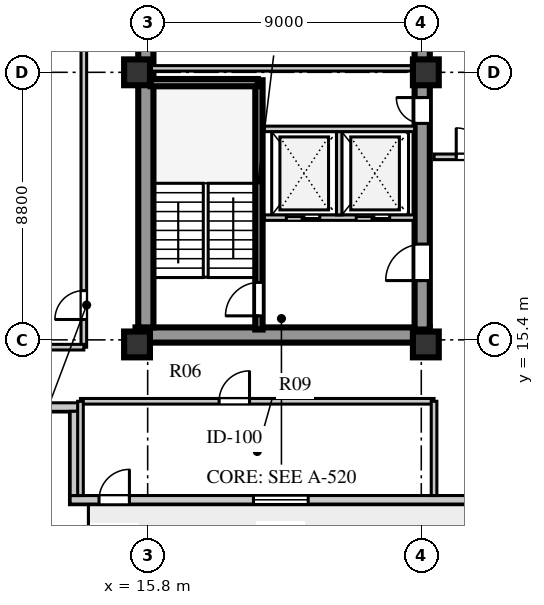
"""IFC4 building model, lengths in metres.
Left out: names, types, materials, properties, quantities, classifications, styles, units other than length and angle.
Written with IfcOpenShell. Run it as: python <this file> out.ifc"""

import sys

from ifc_helpers import new_model, si_unit, direction, frame, frame_2d, origin, origin_2d, place, context, subcontext, project, spatial, rectangle, extrude, element, fill, save


model = new_model("IFC4")
c1 = context("Model", 3, precision=1e-05, world=origin(), true_north=direction((0.0, 1.0)))
c2 = subcontext(c1, "Body", "Model", "MODEL_VIEW")
j1 = project(units=[si_unit("LENGTHUNIT", "METRE"), si_unit("PLANEANGLEUNIT", "RADIAN")], contexts=[c1])
p1 = place(None, origin())
s1 = spatial("IfcSite", under=j1, at=p1, CompositionType="ELEMENT")
p2 = place(p1, origin())
s2 = spatial("IfcBuilding", under=s1, at=p2, CompositionType="ELEMENT")
p3 = place(p2, frame((0.0, 0.0, 150.2)))
s3 = spatial("IfcBuildingStorey", under=s2, at=p3, CompositionType="ELEMENT", Elevation=150.2)
p4 = place(p3, frame((15.4, 15.56, 0.0), z_axis=(0.0, 0.0, 1.0), x_axis=(1.0, 0.0, 0.0)))
e1 = element("IfcWall", 1, at=p4, inside=s3, PredefinedType="SHEAR", context=c2, shape_type="SweptSolid", body=[
    extrude(rectangle(XDim=9.68, YDim=0.5, at=frame_2d((4.84, 0.0))), origin(), (0.0, 0.0, 1.0), 3.55),
])
p5 = place(p3, frame((15.74, 15.81, 0.0), z_axis=(0.0, 0.0, 1.0), x_axis=(0.0, 1.0, 0.0)))
e2 = element("IfcWall", 2, at=p5, inside=s3, PredefinedType="SHEAR", context=c2, shape_type="SweptSolid", body=[
    extrude(rectangle(XDim=25.63, YDim=0.5, at=frame_2d((12.815, 0.0))), origin(), (0.0, 0.0, 1.0), 3.55),
])
p6 = place(p3, frame((24.83, 15.74, 0.0), z_axis=(0.0, 0.0, 1.0), x_axis=(0.0, 1.0, 0.0)))
e3 = element("IfcWall", 3, at=p6, inside=s3, PredefinedType="SHEAR", context=c2, shape_type="SweptSolid", body=[
    extrude(rectangle(XDim=25.76, YDim=0.5, at=frame_2d((12.88, 0.0))), origin(), (0.0, 0.0, 1.0), 3.55),
])
p7 = place(p6, frame((1.61, 0.0, 0.0)))
e4 = element("IfcOpeningElement", 4, at=p7, cuts=e3, PredefinedType="OPENING", context=c2, shape_type="SweptSolid", body=[
    extrude(rectangle(XDim=1.2, YDim=2.1, at=frame_2d((0.6, 1.05))), frame((0.0, 0.26, 0.0), z_axis=(0.0, -1.0, 0.0), x_axis=(1.0, 0.0, 0.0)), (0.0, 0.0, 1.0), 0.52),
])
p8 = place(p6, frame((6.78, 0.0, 0.0)))
e5 = element("IfcOpeningElement", 5, at=p8, cuts=e3, PredefinedType="OPENING", context=c2, shape_type="SweptSolid", body=[
    extrude(rectangle(XDim=0.85, YDim=2.06, at=frame_2d((0.425, 1.03))), frame((0.0, 0.26, 0.0), z_axis=(0.0, -1.0, 0.0), x_axis=(1.0, 0.0, 0.0)), (0.0, 0.0, 1.0), 0.52),
])
p9 = place(p6, frame((12.11, 0.0, 0.0)))
e6 = element("IfcOpeningElement", 6, at=p9, cuts=e3, PredefinedType="OPENING", context=c2, shape_type="SweptSolid", body=[
    extrude(rectangle(XDim=1.5, YDim=2.12, at=frame_2d((0.75, 1.06))), frame((0.0, 0.26, 0.0), z_axis=(0.0, -1.0, 0.0), x_axis=(1.0, 0.0, 0.0)), (0.0, 0.0, 1.0), 0.52),
])
p10 = place(p6, frame((20.11, 0.0, 0.0)))
e7 = element("IfcOpeningElement", 7, at=p10, cuts=e3, PredefinedType="OPENING", context=c2, shape_type="SweptSolid", body=[
    extrude(rectangle(XDim=1.2, YDim=2.12, at=frame_2d((0.6, 1.06))), frame((0.0, 0.26, 0.0), z_axis=(0.0, -1.0, 0.0), x_axis=(1.0, 0.0, 0.0)), (0.0, 0.0, 1.0), 0.52),
])
p11 = place(p6, frame((24.01, 0.0, 0.0)))
e8 = element("IfcOpeningElement", 8, at=p11, cuts=e3, PredefinedType="OPENING", context=c2, shape_type="SweptSolid", body=[
    extrude(rectangle(XDim=0.95, YDim=2.1, at=frame_2d((0.475, 1.05))), frame((0.0, 0.26, 0.0), z_axis=(0.0, -1.0, 0.0), x_axis=(1.0, 0.0, 0.0)), (0.0, 0.0, 1.0), 0.52),
])
for number, where, z_axis, x_axis in (
    (9, (15.45, 15.25, 0.0), (0.0, 0.0, 1.0), (1.0, 0.0, 0.0)),
    (10, (15.45, 24.2, 0.0), (0.0, 0.0, 1.0), (1.0, 0.0, 0.0)),
    (11, (24.95, 15.25, 0.0), (0.0, 0.0, 1.0), (1.0, 0.0, 0.0)),
    (12, (24.95, 24.2, 0.0), (0.0, 0.0, 1.0), (1.0, 0.0, 0.0)),
):
    element("IfcColumn", number, at=place(p3, frame(where, z_axis=z_axis, x_axis=x_axis)), inside=s3, PredefinedType="COLUMN", context=c2, shape_type="SweptSolid", body=[
        extrude(rectangle(XDim=0.85, YDim=0.85, at=origin_2d()), origin(), (0.0, 0.0, 1.0), 3.55),
    ])
p12 = place(p3, frame((13.25, 10.14, 0.0), z_axis=(0.0, 0.0, 1.0), x_axis=(1.0, 0.0, 0.0)))
e13 = element("IfcWall", 13, at=p12, inside=s3, PredefinedType="STANDARD", context=c2, shape_type="SweptSolid", body=[
    extrude(rectangle(XDim=32.1, YDim=0.28, at=frame_2d((16.05, 0.0))), origin(), (0.0, 0.0, 1.0), 3.55),
])
p13 = place(p12, frame((0.95, 0.0, 0.0)))
e14 = element("IfcOpeningElement", 14, at=p13, cuts=e13, PredefinedType="OPENING", context=c2, shape_type="SweptSolid", body=[
    extrude(rectangle(XDim=1.0, YDim=2.05, at=frame_2d((0.5, 1.025))), frame((0.0, 0.15, 0.0), z_axis=(0.0, -1.0, 0.0), x_axis=(1.0, 0.0, 0.0)), (0.0, 0.0, 1.0), 0.3),
])
p14 = place(p12, frame((6.03, 0.0, 0.8)))
e15 = element("IfcOpeningElement", 15, at=p14, cuts=e13, PredefinedType="OPENING", context=c2, shape_type="SweptSolid", body=[
    extrude(rectangle(XDim=1.8, YDim=2.0, at=frame_2d((0.9, 1.0))), frame((0.0, 0.15, 0.0), z_axis=(0.0, -1.0, 0.0), x_axis=(1.0, 0.0, 0.0)), (0.0, 0.0, 1.0), 0.3),
])
p15 = place(p12, frame((17.915, 0.0, 0.8)))
e16 = element("IfcOpeningElement", 16, at=p15, cuts=e13, PredefinedType="OPENING", context=c2, shape_type="SweptSolid", body=[
    extrude(rectangle(XDim=1.5, YDim=2.0, at=frame_2d((0.75, 1.0))), frame((0.0, 0.15, 0.0), z_axis=(0.0, -1.0, 0.0), x_axis=(1.0, 0.0, 0.0)), (0.0, 0.0, 1.0), 0.3),
])
p16 = place(p12, frame((25.865, 0.0, 0.8)))
e17 = element("IfcOpeningElement", 17, at=p16, cuts=e13, PredefinedType="OPENING", context=c2, shape_type="SweptSolid", body=[
    extrude(rectangle(XDim=1.2, YDim=1.75, at=frame_2d((0.6, 0.875))), frame((0.0, 0.15, 0.0), z_axis=(0.0, -1.0, 0.0), x_axis=(1.0, 0.0, 0.0)), (0.0, 0.0, 1.0), 0.3),
])
p17 = place(p12, frame((28.58, 0.0, 0.8)))
e18 = element("IfcOpeningElement", 18, at=p17, cuts=e13, PredefinedType="OPENING", context=c2, shape_type="SweptSolid", body=[
    extrude(rectangle(XDim=2.4, YDim=2.05, at=frame_2d((1.2, 1.025))), frame((0.0, 0.15, 0.0), z_axis=(0.0, -1.0, 0.0), x_axis=(1.0, 0.0, 0.0)), (0.0, 0.0, 1.0), 0.3),
])
p18 = place(p3, frame((10.2, 13.19, 0.0), z_axis=(0.0, 0.0, 1.0), x_axis=(1.0, 0.0, 0.0)))
e19 = element("IfcWall", 19, at=p18, inside=s3, PredefinedType="STANDARD", context=c2, shape_type="SweptSolid", body=[
    extrude(rectangle(XDim=3.33, YDim=0.28, at=frame_2d((1.665, 0.0))), origin(), (0.0, 0.0, 1.0), 3.55),
])
p19 = place(p3, frame((13.39, 13.05, 0.0), z_axis=(0.0, 0.0, 1.0), x_axis=(0.0, -1.0, 0.0)))
e20 = element("IfcWall", 20, at=p19, inside=s3, PredefinedType="STANDARD", context=c2, shape_type="SweptSolid", body=[
    extrude(rectangle(XDim=2.77, YDim=0.28, at=frame_2d((1.385, 0.0))), origin(), (0.0, 0.0, 1.0), 3.55),
])
p20 = place(p3, frame((19.46, 15.74, 0.0), z_axis=(0.0, 0.0, 1.0), x_axis=(0.0, 1.0, 0.0)))
e21 = element("IfcWall", 21, at=p20, inside=s3, PredefinedType="SHEAR", context=c2, shape_type="SweptSolid", body=[
    extrude(rectangle(XDim=8.2, YDim=0.24, at=frame_2d((4.1, 0.0))), origin(), (0.0, 0.0, 1.0), 3.85),
])
p21 = place(p20, frame((0.45, 0.0, 0.0)))
e22 = element("IfcOpeningElement", 22, at=p21, cuts=e21, PredefinedType="OPENING", context=c2, shape_type="SweptSolid", body=[
    extrude(rectangle(XDim=1.1, YDim=2.1, at=frame_2d((0.55, 1.05))), frame((0.0, 0.13, 0.0), z_axis=(0.0, -1.0, 0.0), x_axis=(1.0, 0.0, 0.0)), (0.0, 0.0, 1.0), 0.26),
])
p22 = place(p3, frame((15.9, 23.86, 0.0), z_axis=(0.0, 0.0, 1.0), x_axis=(1.0, 0.0, 0.0)))
e23 = element("IfcWall", 23, at=p22, inside=s3, PredefinedType="SHEAR", context=c2, shape_type="SweptSolid", body=[
    extrude(rectangle(XDim=3.52, YDim=0.24, at=frame_2d((1.76, 0.0))), origin(), (0.0, 0.0, 1.0), 3.85),
])
p23 = place(p3, frame((19.64, 19.42, 0.0), z_axis=(0.0, 0.0, 1.0), x_axis=(1.0, 0.0, 0.0)))
e24 = element("IfcWall", 24, at=p23, inside=s3, PredefinedType="SOLIDWALL", context=c2, shape_type="SweptSolid", body=[
    extrude(rectangle(XDim=4.94, YDim=0.18, at=frame_2d((2.47, 0.0))), origin(), (0.0, 0.0, 1.0), 3.55),
])
p24 = place(p23, frame((0.72, 0.0, 0.0)))
e25 = element("IfcOpeningElement", 25, at=p24, cuts=e24, PredefinedType="OPENING", context=c2, shape_type="SweptSolid", body=[
    extrude(rectangle(XDim=1.1, YDim=2.1, at=frame_2d((0.55, 1.05))), frame((0.0, 0.1, 0.0), z_axis=(0.0, -1.0, 0.0), x_axis=(1.0, 0.0, 0.0)), (0.0, 0.0, 1.0), 0.2),
])
p25 = place(p23, frame((3.02, 0.0, 0.0)))
e26 = element("IfcOpeningElement", 26, at=p25, cuts=e24, PredefinedType="OPENING", context=c2, shape_type="SweptSolid", body=[
    extrude(rectangle(XDim=1.1, YDim=2.1, at=frame_2d((0.55, 1.05))), frame((0.0, 0.1, 0.0), z_axis=(0.0, -1.0, 0.0), x_axis=(1.0, 0.0, 0.0)), (0.0, 0.0, 1.0), 0.2),
])
p26 = place(p3, frame((22.1, 19.51, 0.0), z_axis=(0.0, 0.0, 1.0), x_axis=(0.0, 1.0, 0.0)))
e27 = element("IfcWall", 27, at=p26, inside=s3, PredefinedType="SOLIDWALL", context=c2, shape_type="SweptSolid", body=[
    extrude(rectangle(XDim=2.74, YDim=0.18, at=frame_2d((1.37, 0.0))), origin(), (0.0, 0.0, 1.0), 3.55),
])
p27 = place(p3, frame((19.64, 22.34, 0.0), z_axis=(0.0, 0.0, 1.0), x_axis=(1.0, 0.0, 0.0)))
e28 = element("IfcWall", 28, at=p27, inside=s3, PredefinedType="SOLIDWALL", context=c2, shape_type="SweptSolid", body=[
    extrude(rectangle(XDim=4.94, YDim=0.18, at=frame_2d((2.47, 0.0))), origin(), (0.0, 0.0, 1.0), 3.55),
])
p28 = place(p3, frame((15.9, 24.33, 0.0), z_axis=(0.0, 0.0, 1.0), x_axis=(1.0, 0.0, 0.0)))
e29 = element("IfcWall", 29, at=p28, inside=s3, PredefinedType="SOLIDWALL", context=c2, shape_type="SweptSolid", body=[
    extrude(rectangle(XDim=8.68, YDim=0.18, at=frame_2d((4.34, 0.0))), origin(), (0.0, 0.0, 1.0), 2.9),
])
p29 = place(p3, frame((25.22, 21.42, 0.0), z_axis=(0.0, 0.0, 1.0), x_axis=(1.0, 0.0, 0.0)))
e30 = element("IfcWall", 30, at=p29, inside=s3, PredefinedType="SOLIDWALL", context=c2, shape_type="SweptSolid", body=[
    extrude(rectangle(XDim=15.6, YDim=0.185, at=frame_2d((7.8, 0.0))), origin(), (0.0, 0.0, 1.0), 3.15),
])
p30 = place(p29, frame((0.73, 0.0, 0.0)))
e31 = element("IfcOpeningElement", 31, at=p30, cuts=e30, PredefinedType="OPENING", context=c2, shape_type="SweptSolid", body=[
    extrude(rectangle(XDim=0.95, YDim=2.1, at=frame_2d((0.475, 1.05))), frame((0.0, 0.103, 0.0), z_axis=(0.0, -1.0, 0.0), x_axis=(1.0, 0.0, 0.0)), (0.0, 0.0, 1.0), 0.205),
])
p31 = place(p3, frame((13.7, 15.16, 0.0), z_axis=(0.0, 0.0, 1.0), x_axis=(0.0, 1.0, 0.0)))
e32 = element("IfcWall", 32, at=p31, inside=s3, PredefinedType="SOLIDWALL", context=c2, shape_type="SweptSolid", body=[
    extrude(rectangle(XDim=26.88, YDim=0.185, at=frame_2d((13.44, 0.0))), origin(), (0.0, 0.0, 1.0), 3.55),
])
p32 = place(p31, frame((0.91, 0.0, 0.0)))
e33 = element("IfcOpeningElement", 33, at=p32, cuts=e32, PredefinedType="OPENING", context=c2, shape_type="SweptSolid", body=[
    extrude(rectangle(XDim=0.95, YDim=2.1, at=frame_2d((0.475, 1.05))), frame((0.0, 0.103, 0.0), z_axis=(0.0, -1.0, 0.0), x_axis=(1.0, 0.0, 0.0)), (0.0, 0.0, 1.0), 0.205),
])
p33 = place(p31, frame((11.79, 0.0, 0.0)))
e34 = element("IfcOpeningElement", 34, at=p33, cuts=e32, PredefinedType="OPENING", context=c2, shape_type="SweptSolid", body=[
    extrude(rectangle(XDim=0.95, YDim=2.1, at=frame_2d((0.475, 1.05))), frame((0.0, 0.103, 0.0), z_axis=(0.0, -1.0, 0.0), x_axis=(1.0, 0.0, 0.0)), (0.0, 0.0, 1.0), 0.205),
])
p34 = place(p3, frame((10.48, 15.16, 0.0), z_axis=(0.0, 0.0, 1.0), x_axis=(1.0, 0.0, 0.0)))
e35 = element("IfcWall", 35, at=p34, inside=s3, PredefinedType="SOLIDWALL", context=c2, shape_type="SweptSolid", body=[
    extrude(rectangle(XDim=3.22, YDim=0.185, at=frame_2d((1.61, 0.0))), origin(), (0.0, 0.0, 1.0), 3.05),
])
p35 = place(p3, frame((13.59, 13.38, 0.0), z_axis=(0.0, 0.0, 1.0), x_axis=(1.0, 0.0, 0.0)))
e36 = element("IfcWall", 36, at=p35, inside=s3, PredefinedType="SOLIDWALL", context=c2, shape_type="SweptSolid", body=[
    extrude(rectangle(XDim=11.63, YDim=0.185, at=frame_2d((5.815, 0.0))), origin(), (0.0, 0.0, 1.0), 3.55),
])
p36 = place(p35, frame((4.56, 0.0, 0.0)))
e37 = element("IfcOpeningElement", 37, at=p36, cuts=e36, PredefinedType="OPENING", context=c2, shape_type="SweptSolid", body=[
    extrude(rectangle(XDim=1.0, YDim=2.08, at=frame_2d((0.5, 1.04))), frame((0.0, 0.103, 0.0), z_axis=(0.0, -1.0, 0.0), x_axis=(1.0, 0.0, 0.0)), (0.0, 0.0, 1.0), 0.205),
])
p37 = place(p3, frame((13.59, 10.28, 0.0), z_axis=(0.0, 0.0, 1.0), x_axis=(0.0, 1.0, 0.0)))
e38 = element("IfcWall", 38, at=p37, inside=s3, PredefinedType="SOLIDWALL", context=c2, shape_type="SweptSolid", body=[
    extrude(rectangle(XDim=3.1, YDim=0.185, at=frame_2d((1.55, 0.0))), origin(), (0.0, 0.0, 1.0), 3.55),
])
p38 = place(p3, frame((25.22, 10.28, 0.0), z_axis=(0.0, 0.0, 1.0), x_axis=(0.0, 1.0, 0.0)))
e39 = element("IfcWall", 39, at=p38, inside=s3, PredefinedType="SOLIDWALL", context=c2, shape_type="SweptSolid", body=[
    extrude(rectangle(XDim=3.1, YDim=0.185, at=frame_2d((1.55, 0.0))), origin(), (0.0, 0.0, 1.0), 3.05),
])
p39 = place(p13, frame((1.0, 0.0, 0.0), z_axis=(0.0, 0.0, 1.0), x_axis=(-1.0, 0.0, 0.0)))
e40 = element("IfcDoor", 40, at=p39, inside=s3, OperationType="SINGLE_SWING_LEFT", PredefinedType="DOOR", context=c2, shape_type="SweptSolid", body=[
    extrude(rectangle(XDim=1.0, YDim=2.05, at=frame_2d((0.5, 1.025))), frame((0.0, 0.025, 0.0), z_axis=(0.0, -1.0, 0.0), x_axis=(1.0, 0.0, 0.0)), (0.0, 0.0, 1.0), 0.05),
])
fill(e14, e40)
p40 = place(p14, origin())
e41 = element("IfcWindow", 41, at=p40, inside=s3, PartitioningType="SINGLE_PANEL", PredefinedType="WINDOW", context=c2, shape_type="SweptSolid", body=[
    extrude(rectangle(XDim=1.8, YDim=2.0, at=frame_2d((0.9, 1.0))), frame((0.0, 0.03, 0.0), z_axis=(0.0, -1.0, 0.0), x_axis=(1.0, 0.0, 0.0)), (0.0, 0.0, 1.0), 0.06),
])
fill(e15, e41)
p41 = place(p21, origin())
e42 = element("IfcDoor", 42, at=p41, inside=s3, OperationType="SINGLE_SWING_LEFT", PredefinedType="DOOR", context=c2, shape_type="SweptSolid", body=[
    extrude(rectangle(XDim=1.1, YDim=2.1, at=frame_2d((0.55, 1.05))), frame((0.0, 0.025, 0.0), z_axis=(0.0, -1.0, 0.0), x_axis=(1.0, 0.0, 0.0)), (0.0, 0.0, 1.0), 0.05),
])
fill(e22, e42)
p42 = place(p24, origin())
e43 = element("IfcDoor", 43, at=p42, inside=s3, OperationType="DOUBLE_DOOR_SLIDING", PredefinedType="DOOR", context=c2, shape_type="SweptSolid", body=[
    extrude(rectangle(XDim=1.1, YDim=2.1, at=frame_2d((0.55, 1.05))), frame((0.0, 0.025, 0.0), z_axis=(0.0, -1.0, 0.0), x_axis=(1.0, 0.0, 0.0)), (0.0, 0.0, 1.0), 0.05),
])
fill(e25, e43)
p43 = place(p25, origin())
e44 = element("IfcDoor", 44, at=p43, inside=s3, OperationType="DOUBLE_DOOR_SLIDING", PredefinedType="DOOR", context=c2, shape_type="SweptSolid", body=[
    extrude(rectangle(XDim=1.1, YDim=2.1, at=frame_2d((0.55, 1.05))), frame((0.0, 0.025, 0.0), z_axis=(0.0, -1.0, 0.0), x_axis=(1.0, 0.0, 0.0)), (0.0, 0.0, 1.0), 0.05),
])
fill(e26, e44)
p44 = place(p7, frame((1.2, 0.0, 0.0), z_axis=(0.0, 0.0, 1.0), x_axis=(-1.0, 0.0, 0.0)))
e45 = element("IfcDoor", 45, at=p44, inside=s3, OperationType="SINGLE_SWING_RIGHT", PredefinedType="DOOR", context=c2, shape_type="SweptSolid", body=[
    extrude(rectangle(XDim=1.2, YDim=2.1, at=frame_2d((0.6, 1.05))), frame((0.0, 0.025, 0.0), z_axis=(0.0, -1.0, 0.0), x_axis=(1.0, 0.0, 0.0)), (0.0, 0.0, 1.0), 0.05),
])
fill(e4, e45)
p45 = place(p8, frame((0.85, 0.0, 0.0), z_axis=(0.0, 0.0, 1.0), x_axis=(-1.0, 0.0, 0.0)))
e46 = element("IfcDoor", 46, at=p45, inside=s3, OperationType="SINGLE_SWING_LEFT", PredefinedType="DOOR", context=c2, shape_type="SweptSolid", body=[
    extrude(rectangle(XDim=0.85, YDim=2.06, at=frame_2d((0.425, 1.03))), frame((0.0, 0.025, 0.0), z_axis=(0.0, -1.0, 0.0), x_axis=(1.0, 0.0, 0.0)), (0.0, 0.0, 1.0), 0.05),
])
fill(e5, e46)
p46 = place(p36, frame((1.0, 0.0, 0.0), z_axis=(0.0, 0.0, 1.0), x_axis=(-1.0, 0.0, 0.0)))
e47 = element("IfcDoor", 47, at=p46, inside=s3, OperationType="SINGLE_SWING_LEFT", PredefinedType="DOOR", context=c2, shape_type="SweptSolid", body=[
    extrude(rectangle(XDim=1.0, YDim=2.08, at=frame_2d((0.5, 1.04))), frame((0.0, 0.025, 0.0), z_axis=(0.0, -1.0, 0.0), x_axis=(1.0, 0.0, 0.0)), (0.0, 0.0, 1.0), 0.05),
])
fill(e37, e47)
p47 = place(p32, origin())
e48 = element("IfcDoor", 48, at=p47, inside=s3, OperationType="SINGLE_SWING_LEFT", PredefinedType="DOOR", context=c2, shape_type="SweptSolid", body=[
    extrude(rectangle(XDim=0.95, YDim=2.1, at=frame_2d((0.475, 1.05))), frame((0.0, 0.025, 0.0), z_axis=(0.0, -1.0, 0.0), x_axis=(1.0, 0.0, 0.0)), (0.0, 0.0, 1.0), 0.05),
])
fill(e33, e48)
p48 = place(p30, frame((0.95, 0.0, 0.0), z_axis=(0.0, 0.0, 1.0), x_axis=(-1.0, 0.0, 0.0)))
e49 = element("IfcDoor", 49, at=p48, inside=s3, OperationType="SINGLE_SWING_RIGHT", PredefinedType="DOOR", context=c2, shape_type="SweptSolid", body=[
    extrude(rectangle(XDim=0.95, YDim=2.1, at=frame_2d((0.475, 1.05))), frame((0.0, 0.025, 0.0), z_axis=(0.0, -1.0, 0.0), x_axis=(1.0, 0.0, 0.0)), (0.0, 0.0, 1.0), 0.05),
])
fill(e31, e49)
save(model, sys.argv[1])
